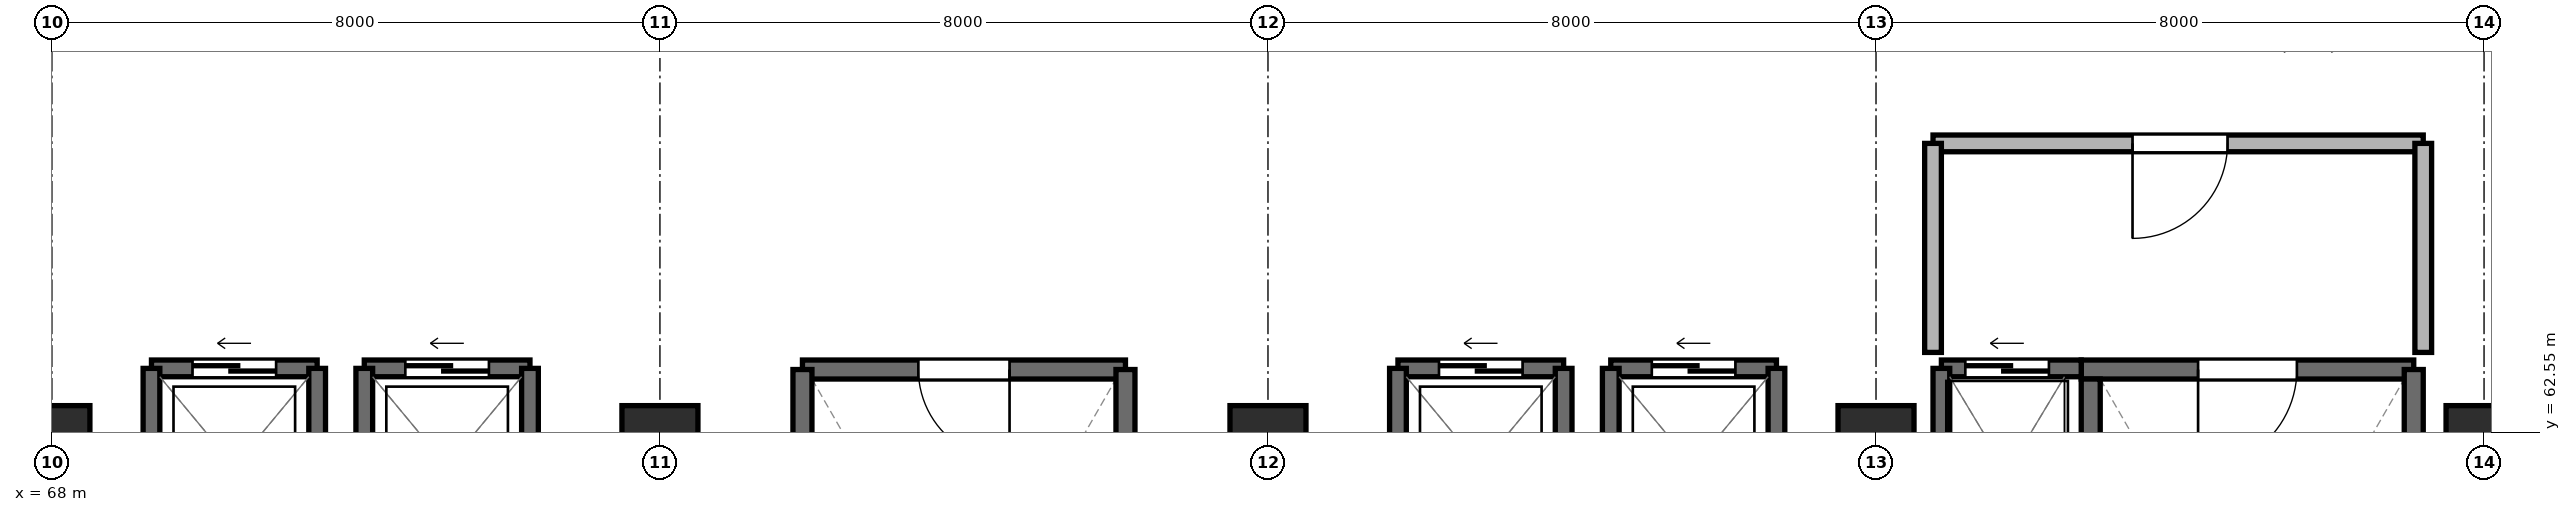
"""IFC4 building model, lengths in metres.
Left out: names, types, materials, properties, quantities, classifications, styles, units other than length and angle.
Written with IfcOpenShell. Run it as: python <this file> out.ifc"""

import sys

from ifc_helpers import new_model, si_unit, direction, frame, frame_2d, origin, origin_2d, place, context, subcontext, project, spatial, rectangle, extrude, element, fill, save


model = new_model("IFC4")
c1 = context("Model", 3, precision=1e-05, world=origin(), true_north=direction((0.0, 1.0)))
c2 = subcontext(c1, "Body", "Model", "MODEL_VIEW")
j1 = project(units=[si_unit("LENGTHUNIT", "METRE"), si_unit("PLANEANGLEUNIT", "RADIAN")], contexts=[c1])
p1 = place(None, origin())
s1 = spatial("IfcSite", under=j1, at=p1, CompositionType="ELEMENT")
p2 = place(p1, origin())
s2 = spatial("IfcBuilding", under=s1, at=p2, CompositionType="ELEMENT")
p3 = place(p2, frame((0.0, 0.0, 14.0)))
s3 = spatial("IfcBuildingStorey", under=s2, at=p3, CompositionType="ELEMENT", Elevation=14.0)
for number, where, z_axis, x_axis in (
    (1, (68.0, 62.4, -0.28), (0.0, 0.0, 1.0), (1.0, 0.0, 0.0)),
    (2, (76.0, 62.4, -0.28), (0.0, 0.0, 1.0), (1.0, 0.0, 0.0)),
    (3, (84.0, 62.4, -0.28), (0.0, 0.0, 1.0), (1.0, 0.0, 0.0)),
    (4, (92.0, 62.4, -0.28), (0.0, 0.0, 1.0), (1.0, 0.0, 0.0)),
    (5, (100.0, 62.4, -0.28), (0.0, 0.0, 1.0), (1.0, 0.0, 0.0)),
):
    element("IfcColumn", number, at=place(p3, frame(where, z_axis=z_axis, x_axis=x_axis)), inside=s3, PredefinedType="COLUMN", context=c2, shape_type="SweptSolid", body=[
        extrude(rectangle(XDim=1.0, YDim=1.0, at=origin_2d()), origin(), (0.0, 0.0, 1.0), 9.93),
    ])
p4 = place(p3, frame((99.075, 63.375, 0.0), z_axis=(0.0, 0.0, 1.0), x_axis=(-1.0, 0.0, 0.0)))
e6 = element("IfcWall", 6, at=p4, inside=s3, PredefinedType="SHEAR", context=c2, shape_type="SweptSolid", body=[
    extrude(rectangle(XDim=4.375, YDim=0.25, at=frame_2d((2.188, 0.0))), origin(), (0.0, 0.0, 1.0), 9.65),
])
p5 = place(p4, frame((1.538, 0.0, 0.0)))
e7 = element("IfcOpeningElement", 7, at=p5, cuts=e6, PredefinedType="OPENING", context=c2, shape_type="SweptSolid", body=[
    extrude(rectangle(XDim=1.3, YDim=2.2, at=frame_2d((0.65, 1.1))), frame((0.0, 0.137, 0.0), z_axis=(0.0, -1.0, 0.0), x_axis=(1.0, 0.0, 0.0)), (0.0, 0.0, 1.0), 0.274),
])
p6 = place(p3, frame((94.825, 63.25, 0.0), z_axis=(0.0, 0.0, 1.0), x_axis=(0.0, -1.0, 0.0)))
e8 = element("IfcWall", 8, at=p6, inside=s3, PredefinedType="SHEAR", context=c2, shape_type="SweptSolid", body=[
    extrude(rectangle(XDim=7.075, YDim=0.25, at=frame_2d((3.538, 0.0))), origin(), (0.0, 0.0, 1.0), 9.65),
])
p7 = place(p3, frame((99.075, 56.175, 0.0), z_axis=(0.0, 0.0, 1.0), x_axis=(0.0, 1.0, 0.0)))
e9 = element("IfcWall", 9, at=p7, inside=s3, PredefinedType="SHEAR", context=c2, shape_type="SweptSolid", body=[
    extrude(rectangle(XDim=7.2, YDim=0.25, at=frame_2d((3.6, 0.0))), origin(), (0.0, 0.0, 1.0), 9.65),
])
p8 = place(p3, frame((82.125, 63.375, 0.0), z_axis=(0.0, 0.0, 1.0), x_axis=(-1.0, 0.0, 0.0)))
e10 = element("IfcWall", 10, at=p8, inside=s3, PredefinedType="SHEAR", context=c2, shape_type="SweptSolid", body=[
    extrude(rectangle(XDim=4.25, YDim=0.25, at=frame_2d((2.125, 0.0))), origin(), (0.0, 0.0, 1.0), 9.65),
])
p9 = place(p8, frame((1.525, 0.0, 0.0)))
e11 = element("IfcOpeningElement", 11, at=p9, cuts=e10, PredefinedType="OPENING", context=c2, shape_type="SweptSolid", body=[
    extrude(rectangle(XDim=1.2, YDim=2.2, at=frame_2d((0.6, 1.1))), frame((0.0, 0.137, 0.0), z_axis=(0.0, -1.0, 0.0), x_axis=(1.0, 0.0, 0.0)), (0.0, 0.0, 1.0), 0.274),
])
for number, where, z_axis, x_axis in (
    (12, (77.875, 63.375, 0.0), (0.0, 0.0, 1.0), (0.0, -1.0, 0.0)),
    (13, (82.125, 56.175, 0.0), (0.0, 0.0, 1.0), (0.0, 1.0, 0.0)),
):
    element("IfcWall", number, at=place(p3, frame(where, z_axis=z_axis, x_axis=x_axis)), inside=s3, PredefinedType="SHEAR", context=c2, shape_type="SweptSolid", body=[
        extrude(rectangle(XDim=7.2, YDim=0.25, at=frame_2d((3.6, 0.0))), origin(), (0.0, 0.0, 1.0), 9.65),
    ])
p10 = place(p3, frame((94.7, 63.39, 0.0), z_axis=(0.0, 0.0, 1.0), x_axis=(-1.0, 0.0, 0.0)))
e14 = element("IfcWall", 14, at=p10, inside=s3, PredefinedType="SHEAR", context=c2, shape_type="SweptSolid", body=[
    extrude(rectangle(XDim=1.84, YDim=0.22, at=frame_2d((0.92, 0.0))), origin(), (0.0, 0.0, 1.0), 9.65),
])
p11 = place(p10, frame((0.425, 0.0, 0.0)))
e15 = element("IfcOpeningElement", 15, at=p11, cuts=e14, PredefinedType="OPENING", context=c2, shape_type="SweptSolid", body=[
    extrude(rectangle(XDim=1.1, YDim=2.2, at=frame_2d((0.55, 1.1))), frame((0.0, 0.122, 0.0), z_axis=(0.0, -1.0, 0.0), x_axis=(1.0, 0.0, 0.0)), (0.0, 0.0, 1.0), 0.244),
])
p12 = place(p3, frame((92.86, 63.39, 0.0), z_axis=(0.0, 0.0, 1.0), x_axis=(0.0, -1.0, 0.0)))
e16 = element("IfcWall", 16, at=p12, inside=s3, PredefinedType="SHEAR", context=c2, shape_type="SweptSolid", body=[
    extrude(rectangle(XDim=2.73, YDim=0.22, at=frame_2d((1.365, 0.0))), origin(), (0.0, 0.0, 1.0), 9.65),
])
p13 = place(p3, frame((71.49, 63.39, 0.0), z_axis=(0.0, 0.0, 1.0), x_axis=(-1.0, 0.0, 0.0)))
e17 = element("IfcWall", 17, at=p13, inside=s3, PredefinedType="SHEAR", context=c2, shape_type="SweptSolid", body=[
    extrude(rectangle(XDim=2.18, YDim=0.22, at=frame_2d((1.09, 0.0))), origin(), (0.0, 0.0, 1.0), 9.65),
])
p14 = place(p13, frame((0.54, 0.0, 0.0)))
e18 = element("IfcOpeningElement", 18, at=p14, cuts=e17, PredefinedType="OPENING", context=c2, shape_type="SweptSolid", body=[
    extrude(rectangle(XDim=1.1, YDim=2.2, at=frame_2d((0.55, 1.1))), frame((0.0, 0.122, 0.0), z_axis=(0.0, -1.0, 0.0), x_axis=(1.0, 0.0, 0.0)), (0.0, 0.0, 1.0), 0.244),
])
for number, where, z_axis, x_axis in (
    (19, (69.31, 63.39, 0.0), (0.0, 0.0, 1.0), (0.0, -1.0, 0.0)),
    (20, (71.49, 60.81, 0.0), (0.0, 0.0, 1.0), (0.0, 1.0, 0.0)),
):
    element("IfcWall", number, at=place(p3, frame(where, z_axis=z_axis, x_axis=x_axis)), inside=s3, PredefinedType="SHEAR", context=c2, shape_type="SweptSolid", body=[
        extrude(rectangle(XDim=2.58, YDim=0.22, at=frame_2d((1.29, 0.0))), origin(), (0.0, 0.0, 1.0), 9.65),
    ])
p15 = place(p3, frame((74.29, 63.39, 0.0), z_axis=(0.0, 0.0, 1.0), x_axis=(-1.0, 0.0, 0.0)))
e21 = element("IfcWall", 21, at=p15, inside=s3, PredefinedType="SHEAR", context=c2, shape_type="SweptSolid", body=[
    extrude(rectangle(XDim=2.18, YDim=0.22, at=frame_2d((1.09, 0.0))), origin(), (0.0, 0.0, 1.0), 9.65),
])
p16 = place(p15, frame((0.54, 0.0, 0.0)))
e22 = element("IfcOpeningElement", 22, at=p16, cuts=e21, PredefinedType="OPENING", context=c2, shape_type="SweptSolid", body=[
    extrude(rectangle(XDim=1.1, YDim=2.2, at=frame_2d((0.55, 1.1))), frame((0.0, 0.122, 0.0), z_axis=(0.0, -1.0, 0.0), x_axis=(1.0, 0.0, 0.0)), (0.0, 0.0, 1.0), 0.244),
])
for number, where, z_axis, x_axis in (
    (23, (72.11, 63.39, 0.0), (0.0, 0.0, 1.0), (0.0, -1.0, 0.0)),
    (24, (74.29, 60.81, 0.0), (0.0, 0.0, 1.0), (0.0, 1.0, 0.0)),
):
    element("IfcWall", number, at=place(p3, frame(where, z_axis=z_axis, x_axis=x_axis)), inside=s3, PredefinedType="SHEAR", context=c2, shape_type="SweptSolid", body=[
        extrude(rectangle(XDim=2.58, YDim=0.22, at=frame_2d((1.29, 0.0))), origin(), (0.0, 0.0, 1.0), 9.65),
    ])
p17 = place(p3, frame((87.89, 63.39, 0.0), z_axis=(0.0, 0.0, 1.0), x_axis=(-1.0, 0.0, 0.0)))
e25 = element("IfcWall", 25, at=p17, inside=s3, PredefinedType="SHEAR", context=c2, shape_type="SweptSolid", body=[
    extrude(rectangle(XDim=2.18, YDim=0.22, at=frame_2d((1.09, 0.0))), origin(), (0.0, 0.0, 1.0), 9.65),
])
p18 = place(p17, frame((0.54, 0.0, 0.0)))
e26 = element("IfcOpeningElement", 26, at=p18, cuts=e25, PredefinedType="OPENING", context=c2, shape_type="SweptSolid", body=[
    extrude(rectangle(XDim=1.1, YDim=2.2, at=frame_2d((0.55, 1.1))), frame((0.0, 0.122, 0.0), z_axis=(0.0, -1.0, 0.0), x_axis=(1.0, 0.0, 0.0)), (0.0, 0.0, 1.0), 0.244),
])
for number, where, z_axis, x_axis in (
    (27, (85.71, 63.39, 0.0), (0.0, 0.0, 1.0), (0.0, -1.0, 0.0)),
    (28, (87.89, 60.81, 0.0), (0.0, 0.0, 1.0), (0.0, 1.0, 0.0)),
):
    element("IfcWall", number, at=place(p3, frame(where, z_axis=z_axis, x_axis=x_axis)), inside=s3, PredefinedType="SHEAR", context=c2, shape_type="SweptSolid", body=[
        extrude(rectangle(XDim=2.58, YDim=0.22, at=frame_2d((1.29, 0.0))), origin(), (0.0, 0.0, 1.0), 9.65),
    ])
p19 = place(p3, frame((90.69, 63.39, 0.0), z_axis=(0.0, 0.0, 1.0), x_axis=(-1.0, 0.0, 0.0)))
e29 = element("IfcWall", 29, at=p19, inside=s3, PredefinedType="SHEAR", context=c2, shape_type="SweptSolid", body=[
    extrude(rectangle(XDim=2.18, YDim=0.22, at=frame_2d((1.09, 0.0))), origin(), (0.0, 0.0, 1.0), 9.65),
])
p20 = place(p19, frame((0.54, 0.0, 0.0)))
e30 = element("IfcOpeningElement", 30, at=p20, cuts=e29, PredefinedType="OPENING", context=c2, shape_type="SweptSolid", body=[
    extrude(rectangle(XDim=1.1, YDim=2.2, at=frame_2d((0.55, 1.1))), frame((0.0, 0.122, 0.0), z_axis=(0.0, -1.0, 0.0), x_axis=(1.0, 0.0, 0.0)), (0.0, 0.0, 1.0), 0.244),
])
for number, where, z_axis, x_axis in (
    (31, (88.51, 63.39, 0.0), (0.0, 0.0, 1.0), (0.0, -1.0, 0.0)),
    (32, (90.69, 60.81, 0.0), (0.0, 0.0, 1.0), (0.0, 1.0, 0.0)),
):
    element("IfcWall", number, at=place(p3, frame(where, z_axis=z_axis, x_axis=x_axis)), inside=s3, PredefinedType="SHEAR", context=c2, shape_type="SweptSolid", body=[
        extrude(rectangle(XDim=2.58, YDim=0.22, at=frame_2d((1.29, 0.0))), origin(), (0.0, 0.0, 1.0), 9.65),
    ])
p21 = place(p3, frame((92.75, 66.35, 0.0), z_axis=(0.0, 0.0, 1.0), x_axis=(1.0, 0.0, 0.0)))
e33 = element("IfcWall", 33, at=p21, inside=s3, PredefinedType="PARTITIONING", context=c2, shape_type="SweptSolid", body=[
    extrude(rectangle(XDim=6.45, YDim=0.22, at=frame_2d((3.225, 0.0))), origin(), (0.0, 0.0, 1.0), 9.43),
])
p22 = place(p21, frame((2.625, 0.0, 0.0)))
e34 = element("IfcOpeningElement", 34, at=p22, cuts=e33, PredefinedType="OPENING", context=c2, shape_type="SweptSolid", body=[
    extrude(rectangle(XDim=1.25, YDim=2.2, at=frame_2d((0.625, 1.1))), frame((0.0, 0.122, 0.0), z_axis=(0.0, -1.0, 0.0), x_axis=(1.0, 0.0, 0.0)), (0.0, 0.0, 1.0), 0.244),
])
for number, where, z_axis, x_axis in (
    (35, (92.75, 63.6, 0.0), (0.0, 0.0, 1.0), (0.0, 1.0, 0.0)),
    (36, (99.2, 63.6, 0.0), (0.0, 0.0, 1.0), (0.0, 1.0, 0.0)),
):
    element("IfcWall", number, at=place(p3, frame(where, z_axis=z_axis, x_axis=x_axis)), inside=s3, PredefinedType="PARTITIONING", context=c2, shape_type="SweptSolid", body=[
        extrude(rectangle(XDim=2.75, YDim=0.22, at=frame_2d((1.375, 0.0))), origin(), (0.0, 0.0, 1.0), 9.43),
    ])
p23 = place(p5, origin())
e37 = element("IfcDoor", 37, at=p23, inside=s3, OperationType="SINGLE_SWING_RIGHT", PredefinedType="DOOR", context=c2, shape_type="SweptSolid", body=[
    extrude(rectangle(XDim=1.3, YDim=2.2, at=frame_2d((0.65, 1.1))), frame((0.0, 0.025, 0.0), z_axis=(0.0, -1.0, 0.0), x_axis=(1.0, 0.0, 0.0)), (0.0, 0.0, 1.0), 0.05),
])
fill(e7, e37)
p24 = place(p9, origin())
e38 = element("IfcDoor", 38, at=p24, inside=s3, OperationType="SINGLE_SWING_LEFT", PredefinedType="DOOR", context=c2, shape_type="SweptSolid", body=[
    extrude(rectangle(XDim=1.2, YDim=2.2, at=frame_2d((0.6, 1.1))), frame((0.0, 0.025, 0.0), z_axis=(0.0, -1.0, 0.0), x_axis=(1.0, 0.0, 0.0)), (0.0, 0.0, 1.0), 0.05),
])
fill(e11, e38)
p25 = place(p11, origin())
e39 = element("IfcDoor", 39, at=p25, inside=s3, OperationType="SLIDING_TO_RIGHT", PredefinedType="DOOR", context=c2, shape_type="SweptSolid", body=[
    extrude(rectangle(XDim=1.1, YDim=2.2, at=frame_2d((0.55, 1.1))), frame((0.0, 0.025, 0.0), z_axis=(0.0, -1.0, 0.0), x_axis=(1.0, 0.0, 0.0)), (0.0, 0.0, 1.0), 0.05),
])
fill(e15, e39)
p26 = place(p14, origin())
e40 = element("IfcDoor", 40, at=p26, inside=s3, OperationType="SLIDING_TO_RIGHT", PredefinedType="DOOR", context=c2, shape_type="SweptSolid", body=[
    extrude(rectangle(XDim=1.1, YDim=2.2, at=frame_2d((0.55, 1.1))), frame((0.0, 0.025, 0.0), z_axis=(0.0, -1.0, 0.0), x_axis=(1.0, 0.0, 0.0)), (0.0, 0.0, 1.0), 0.05),
])
fill(e18, e40)
p27 = place(p16, origin())
e41 = element("IfcDoor", 41, at=p27, inside=s3, OperationType="SLIDING_TO_RIGHT", PredefinedType="DOOR", context=c2, shape_type="SweptSolid", body=[
    extrude(rectangle(XDim=1.1, YDim=2.2, at=frame_2d((0.55, 1.1))), frame((0.0, 0.025, 0.0), z_axis=(0.0, -1.0, 0.0), x_axis=(1.0, 0.0, 0.0)), (0.0, 0.0, 1.0), 0.05),
])
fill(e22, e41)
p28 = place(p18, origin())
e42 = element("IfcDoor", 42, at=p28, inside=s3, OperationType="SLIDING_TO_RIGHT", PredefinedType="DOOR", context=c2, shape_type="SweptSolid", body=[
    extrude(rectangle(XDim=1.1, YDim=2.2, at=frame_2d((0.55, 1.1))), frame((0.0, 0.025, 0.0), z_axis=(0.0, -1.0, 0.0), x_axis=(1.0, 0.0, 0.0)), (0.0, 0.0, 1.0), 0.05),
])
fill(e26, e42)
p29 = place(p20, origin())
e43 = element("IfcDoor", 43, at=p29, inside=s3, OperationType="SLIDING_TO_RIGHT", PredefinedType="DOOR", context=c2, shape_type="SweptSolid", body=[
    extrude(rectangle(XDim=1.1, YDim=2.2, at=frame_2d((0.55, 1.1))), frame((0.0, 0.025, 0.0), z_axis=(0.0, -1.0, 0.0), x_axis=(1.0, 0.0, 0.0)), (0.0, 0.0, 1.0), 0.05),
])
fill(e30, e43)
p30 = place(p22, frame((1.25, 0.0, 0.0), z_axis=(0.0, 0.0, 1.0), x_axis=(-1.0, 0.0, 0.0)))
e44 = element("IfcDoor", 44, at=p30, inside=s3, OperationType="SINGLE_SWING_LEFT", PredefinedType="DOOR", context=c2, shape_type="SweptSolid", body=[
    extrude(rectangle(XDim=1.25, YDim=2.2, at=frame_2d((0.625, 1.1))), frame((0.0, 0.025, 0.0), z_axis=(0.0, -1.0, 0.0), x_axis=(1.0, 0.0, 0.0)), (0.0, 0.0, 1.0), 0.05),
])
fill(e34, e44)
save(model, sys.argv[1])
